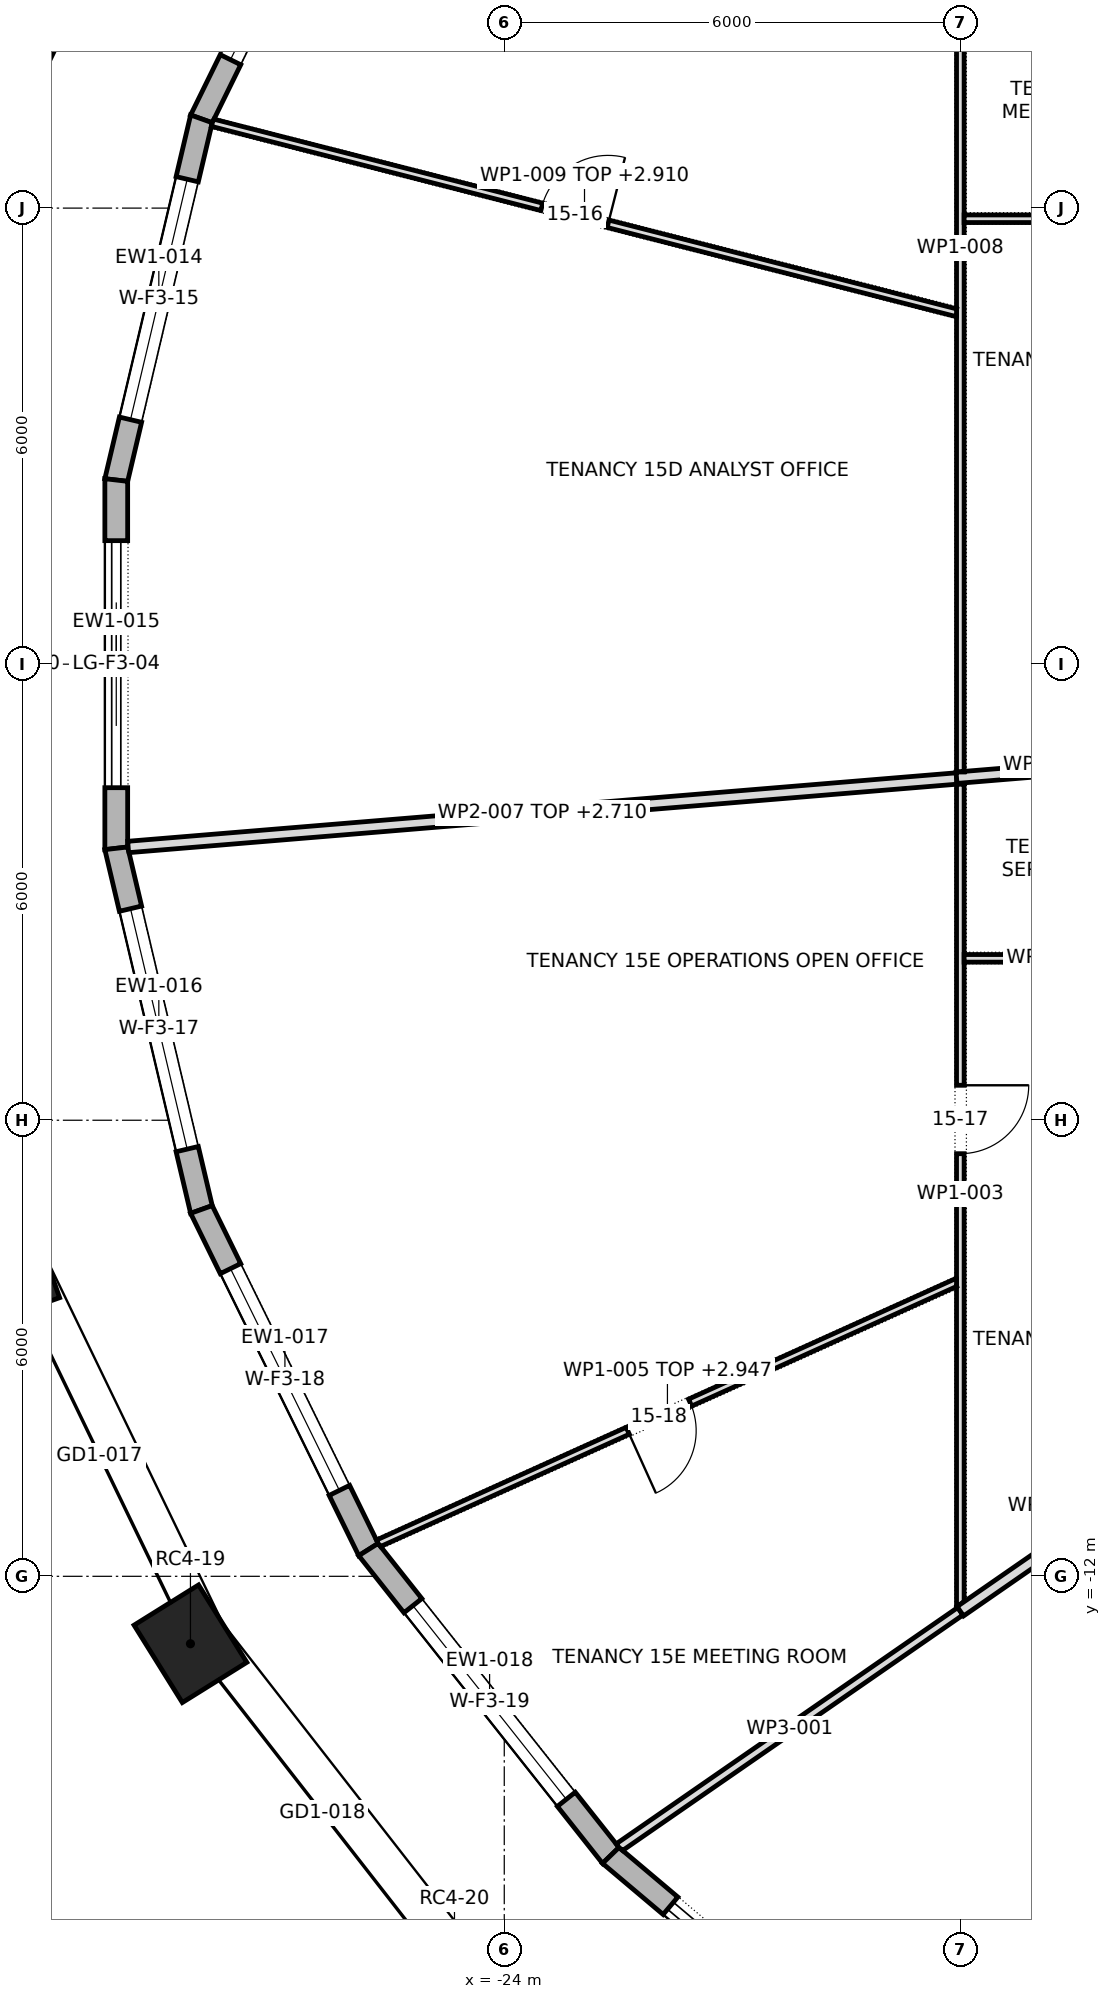
"""IFC4 building model, lengths in metres.
Left out: names, types, materials, properties, quantities, classifications, styles, units other than length and angle.
Written with IfcOpenShell. Run it as: python <this file> out.ifc"""

import sys

from ifc_helpers import new_model, si_unit, direction, frame, frame_2d, origin, origin_2d, place, context, subcontext, project, spatial, polyline, rectangle, outline, extrude, element, fill, save


model = new_model("IFC4")
c1 = context("Model", 3, precision=1e-05, world=origin(), true_north=direction((0.0, 1.0)))
c2 = subcontext(c1, "Body", "Model", "MODEL_VIEW")
j1 = project(units=[si_unit("LENGTHUNIT", "METRE"), si_unit("PLANEANGLEUNIT", "RADIAN")], contexts=[c1])
p1 = place(None, origin())
s1 = spatial("IfcSite", under=j1, at=p1, CompositionType="ELEMENT")
p2 = place(p1, origin())
s2 = spatial("IfcBuilding", under=s1, at=p2, CompositionType="ELEMENT")
p3 = place(p2, frame((0.0, 0.0, 214.9)))
s3 = spatial("IfcBuildingStorey", under=s2, at=p3, CompositionType="ELEMENT", Elevation=214.9)
for number, where, z_axis, x_axis in (
    (1, (-30.521, 7.936, 0.0), (0.0, 0.0, 1.0), (-0.334, -0.943, 0.0)),
    (2, (-30.521, -7.936, 0.0), (0.0, 0.0, 1.0), (0.334, -0.943, 0.0)),
    (3, (-28.129, -12.887, 0.0), (0.0, 0.0, 1.0), (0.529, -0.849, 0.0)),
):
    element("IfcColumn", number, at=place(p3, frame(where, z_axis=z_axis, x_axis=x_axis)), inside=s3, PredefinedType="COLUMN", context=c2, shape_type="SweptSolid", body=[
        extrude(rectangle(XDim=1.2, YDim=1.0, at=origin_2d()), origin(), (0.0, 0.0, 1.0), 4.0),
    ])
p4 = place(p3, frame((-25.787, 11.648, 0.0), z_axis=(0.0, 0.0, 1.0), x_axis=(-0.440795186599, -0.897607711348, 0.0)))
e4 = element("IfcWall", 4, at=p4, inside=s3, PredefinedType="STANDARD", context=c2, shape_type="SweptSolid", body=[
    extrude(outline(polyline([(-0.016, -0.15), (5.001, -0.15), (4.967, 0.15), (0.016, 0.15), (-0.016, -0.15)])), origin(), (0.0, 0.0, 1.0), 3.7),
])
p5 = place(p4, frame((0.867, 0.0, 0.6)))
e5 = element("IfcOpeningElement", 5, at=p5, cuts=e4, PredefinedType="OPENING", context=c2, shape_type="SweptSolid", body=[
    extrude(rectangle(XDim=3.25, YDim=2.65, at=frame_2d((1.625, 1.325))), frame((0.0, 0.162, 0.0), z_axis=(0.0, -1.0, 0.0), x_axis=(1.0, 0.0, 0.0)), (0.0, 0.0, 1.0), 0.324),
])
p6 = place(p3, frame((-27.984, 7.174, 0.0), z_axis=(0.0, 0.0, 1.0), x_axis=(-0.229546618766, -0.97329766763, 0.0)))
e6 = element("IfcWall", 6, at=p6, inside=s3, PredefinedType="STANDARD", context=c2, shape_type="SweptSolid", body=[
    extrude(outline(polyline([(-0.017, -0.15), (4.899, -0.15), (4.865, 0.15), (0.017, 0.15), (-0.017, -0.15)])), origin(), (0.0, 0.0, 1.0), 3.7),
])
p7 = place(p6, frame((0.816, 0.0, 0.6)))
e7 = element("IfcOpeningElement", 7, at=p7, cuts=e6, PredefinedType="OPENING", context=c2, shape_type="SweptSolid", body=[
    extrude(rectangle(XDim=3.25, YDim=2.65, at=frame_2d((1.625, 1.325))), frame((0.0, 0.162, 0.0), z_axis=(0.0, -1.0, 0.0), x_axis=(1.0, 0.0, 0.0)), (0.0, 0.0, 1.0), 0.324),
])
p8 = place(p3, frame((-29.104, 2.423, 0.0), z_axis=(0.0, 0.0, 1.0), x_axis=(0.0, -1.0, 0.0)))
e8 = element("IfcWall", 8, at=p8, inside=s3, PredefinedType="STANDARD", context=c2, shape_type="SweptSolid", body=[
    extrude(outline(polyline([(-0.017, -0.15), (4.863, -0.15), (4.828, 0.15), (0.017, 0.15), (-0.017, -0.15)])), origin(), (0.0, 0.0, 1.0), 3.7),
])
p9 = place(p8, frame((0.798, 0.0, 0.0)))
e9 = element("IfcOpeningElement", 9, at=p9, cuts=e8, PredefinedType="OPENING", context=c2, shape_type="SweptSolid", body=[
    extrude(rectangle(XDim=3.25, YDim=3.25, at=frame_2d((1.625, 1.625))), frame((0.0, 0.162, 0.0), z_axis=(0.0, -1.0, 0.0), x_axis=(1.0, 0.0, 0.0)), (0.0, 0.0, 1.0), 0.324),
])
p10 = place(p3, frame((-29.104, -2.423, 0.0), z_axis=(0.0, 0.0, 1.0), x_axis=(0.229546618766, -0.97329766763, 0.0)))
e10 = element("IfcWall", 10, at=p10, inside=s3, PredefinedType="STANDARD", context=c2, shape_type="SweptSolid", body=[
    extrude(outline(polyline([(-0.017, -0.15), (4.899, -0.15), (4.865, 0.15), (0.017, 0.15), (-0.017, -0.15)])), origin(), (0.0, 0.0, 1.0), 3.7),
])
p11 = place(p10, frame((0.816, 0.0, 0.6)))
e11 = element("IfcOpeningElement", 11, at=p11, cuts=e10, PredefinedType="OPENING", context=c2, shape_type="SweptSolid", body=[
    extrude(rectangle(XDim=3.25, YDim=2.65, at=frame_2d((1.625, 1.325))), frame((0.0, 0.162, 0.0), z_axis=(0.0, -1.0, 0.0), x_axis=(1.0, 0.0, 0.0)), (0.0, 0.0, 1.0), 0.324),
])
p12 = place(p3, frame((-27.984, -7.174, 0.0), z_axis=(0.0, 0.0, 1.0), x_axis=(0.440795186599, -0.897607711348, 0.0)))
e12 = element("IfcWall", 12, at=p12, inside=s3, PredefinedType="STANDARD", context=c2, shape_type="SweptSolid", body=[
    extrude(outline(polyline([(-0.017, -0.15), (5.0, -0.15), (4.968, 0.15), (0.017, 0.15), (-0.017, -0.15)])), origin(), (0.0, 0.0, 1.0), 3.7),
])
p13 = place(p12, frame((0.867, 0.0, 0.6)))
e13 = element("IfcOpeningElement", 13, at=p13, cuts=e12, PredefinedType="OPENING", context=c2, shape_type="SweptSolid", body=[
    extrude(rectangle(XDim=3.25, YDim=2.65, at=frame_2d((1.625, 1.325))), frame((0.0, 0.162, 0.0), z_axis=(0.0, -1.0, 0.0), x_axis=(1.0, 0.0, 0.0)), (0.0, 0.0, 1.0), 0.324),
])
p14 = place(p3, frame((-25.787, -11.648, 0.0), z_axis=(0.0, 0.0, 1.0), x_axis=(0.621017151557, -0.783796974651, 0.0)))
e14 = element("IfcWall", 14, at=p14, inside=s3, PredefinedType="STANDARD", context=c2, shape_type="SweptSolid", body=[
    extrude(outline(polyline([(-0.016, -0.15), (5.149, -0.15), (5.119, 0.15), (0.016, 0.15), (-0.016, -0.15)])), origin(), (0.0, 0.0, 1.0), 3.7),
])
p15 = place(p14, frame((0.942, 0.0, 0.6)))
e15 = element("IfcOpeningElement", 15, at=p15, cuts=e14, PredefinedType="OPENING", context=c2, shape_type="SweptSolid", body=[
    extrude(rectangle(XDim=3.25, YDim=2.65, at=frame_2d((1.625, 1.325))), frame((0.0, 0.162, 0.0), z_axis=(0.0, -1.0, 0.0), x_axis=(1.0, 0.0, 0.0)), (0.0, 0.0, 1.0), 0.324),
])
p16 = place(p3, frame((-22.599, -15.672, 0.0), z_axis=(0.0, 0.0, 1.0), x_axis=(0.764397795062, -0.644744919255, 0.0)))
e16 = element("IfcWall", 16, at=p16, inside=s3, PredefinedType="STANDARD", context=c2, shape_type="SweptSolid", body=[
    extrude(outline(polyline([(-0.015, -0.15), (5.319, -0.15), (5.291, 0.15), (0.015, 0.15), (-0.015, -0.15)])), origin(), (0.0, 0.0, 1.0), 3.7),
])
p17 = place(p16, frame((1.028, 0.0, 0.0)))
e17 = element("IfcOpeningElement", 17, at=p17, cuts=e16, PredefinedType="OPENING", context=c2, shape_type="SweptSolid", body=[
    extrude(rectangle(XDim=3.25, YDim=3.25, at=frame_2d((1.625, 1.625))), frame((0.0, 0.162, 0.0), z_axis=(0.0, -1.0, 0.0), x_axis=(1.0, 0.0, 0.0)), (0.0, 0.0, 1.0), 0.324),
])
p18 = place(p3, frame((-22.493, -15.569, 0.0), z_axis=(0.0, 0.0, 1.0), x_axis=(0.822322462014, 0.569021764494, 0.0)))
e18 = element("IfcWall", 18, at=p18, inside=s3, PredefinedType="PARTITIONING", context=c2, shape_type="SweptSolid", body=[
    extrude(outline(polyline([(0.02, -0.06), (1.834, -0.06), (3.649, -0.06), (5.464, -0.06), (5.464, 0.06), (3.643, 0.06), (1.821, 0.06), (0.0, 0.06), (0.0, 0.053), (0.003, 0.0), (0.02, -0.06)])), origin(), (0.0, 0.0, 1.0), 3.7),
])
p19 = place(p3, frame((-18.0, -12.421, 0.0), z_axis=(0.0, 0.0, 1.0), x_axis=(0.0, 1.0, 0.0)))
e19 = element("IfcWall", 19, at=p19, inside=s3, PredefinedType="PARTITIONING", context=c2, shape_type="SweptSolid", body=[
    extrude(outline(polyline([(0.087, -0.05), (1.77, -0.05), (3.453, -0.05), (5.136, -0.05), (6.819, -0.05), (8.501, -0.05), (8.501, -0.05), (8.601, -0.05), (8.601, -0.05), (10.842, -0.05), (10.842, 0.046), (10.842, 0.05), (9.191, 0.05), (7.541, 0.05), (5.89, 0.05), (4.24, 0.05), (4.235, 0.048), (4.234, 0.05), (2.823, 0.05), (1.411, 0.05), (0.0, 0.05), (0.0, 0.05), (0.011, 0.034), (0.023, 0.043), (0.087, -0.05)])), origin(), (0.0, 0.0, 1.0), 3.7),
])
p20 = place(p19, frame((5.981, 0.0, 0.0)))
e20 = element("IfcOpeningElement", 20, at=p20, cuts=e19, PredefinedType="OPENING", context=c2, shape_type="SweptSolid", body=[
    extrude(rectangle(XDim=0.9, YDim=2.1, at=frame_2d((0.45, 1.05))), frame((0.0, 0.062, 0.0), z_axis=(0.0, -1.0, 0.0), x_axis=(1.0, 0.0, 0.0)), (0.0, 0.0, 1.0), 0.124),
])
p21 = place(p3, frame((-18.0, -12.46, 0.0), z_axis=(0.0, 0.0, 1.0), x_axis=(0.822102584422, 0.56933938972, 0.0)))
e21 = element("IfcWall", 21, at=p21, inside=s3, PredefinedType="PARTITIONING", context=c2, shape_type="SweptSolid", body=[
    extrude(outline(polyline([(0.0, -0.075), (1.635, -0.075), (3.27, -0.075), (4.905, -0.075), (4.826, 0.075), (3.217, 0.075), (1.609, 0.075), (0.0, 0.075), (0.0, -0.075)])), origin(), (0.0, 0.0, 1.0), 2.947),
])
p22 = place(p3, frame((-18.03, -8.123, 0.0), z_axis=(0.0, 0.0, 1.0), x_axis=(-0.911431984772, -0.411450771216, 0.0)))
e22 = element("IfcWall", 22, at=p22, inside=s3, PredefinedType="PARTITIONING", context=c2, shape_type="SweptSolid", body=[
    extrude(outline(polyline([(8.372, -0.05), (8.372, -0.042), (8.371, -0.0), (8.358, 0.05), (6.696, 0.05), (5.033, 0.05), (3.37, 0.05), (1.708, 0.05), (0.045, 0.05), (0.0, -0.05), (0.0, -0.05), (1.675, -0.05), (3.349, -0.05), (5.023, -0.05), (6.698, -0.05), (8.372, -0.05)])), origin(), (0.0, 0.0, 1.0), 2.947),
])
p23 = place(p22, frame((3.868, 0.0, 0.0)))
e23 = element("IfcOpeningElement", 23, at=p23, cuts=e22, PredefinedType="OPENING", context=c2, shape_type="SweptSolid", body=[
    extrude(rectangle(XDim=0.9, YDim=2.1, at=frame_2d((0.45, 1.05))), frame((0.0, 0.062, 0.0), z_axis=(0.0, -1.0, 0.0), x_axis=(1.0, 0.0, 0.0)), (0.0, 0.0, 1.0), 0.124),
])
p24 = place(p3, frame((-17.95, -3.87, 0.0), z_axis=(0.0, 0.0, 1.0), x_axis=(1.0, 0.0, 0.0)))
e24 = element("IfcWall", 24, at=p24, inside=s3, PredefinedType="PARTITIONING", context=c2, shape_type="SweptSolid", body=[
    extrude(rectangle(XDim=2.258, YDim=0.1, at=frame_2d((1.129, 0.0))), origin(), (0.0, 0.0, 1.0), 3.7),
])
p25 = place(p3, frame((-18.049, -1.504, 0.0), z_axis=(0.0, 0.0, 1.0), x_axis=(-0.996601116086, -0.082378488796, 0.0)))
e25 = element("IfcWall", 25, at=p25, inside=s3, PredefinedType="PARTITIONING", context=c2, shape_type="SweptSolid", body=[
    extrude(outline(polyline([(10.936, -0.075), (10.936, 0.044), (10.931, 0.075), (9.11, 0.075), (7.29, 0.075), (5.469, 0.075), (3.648, 0.075), (1.828, 0.075), (0.007, 0.075), (0.007, 0.074), (0.002, 0.075), (0.0, 0.075), (0.0, -0.075), (1.823, -0.075), (3.645, -0.075), (5.468, -0.075), (7.291, -0.075), (9.113, -0.075), (10.936, -0.075)])), origin(), (0.0, 0.0, 1.0), 2.71),
])
p26 = place(p3, frame((-18.0, -1.418, 0.0), z_axis=(0.0, 0.0, 1.0), x_axis=(0.0, 1.0, 0.0)))
e26 = element("IfcWall", 26, at=p26, inside=s3, PredefinedType="PARTITIONING", context=c2, shape_type="SweptSolid", body=[
    extrude(outline(polyline([(0.008, -0.05), (1.813, -0.05), (3.618, -0.05), (5.423, -0.05), (7.229, -0.05), (7.229, -0.05), (7.328, -0.05), (7.328, -0.05), (8.934, -0.05), (10.54, -0.05), (12.146, -0.05), (13.751, -0.05), (13.821, 0.05), (13.821, 0.05), (11.889, 0.05), (9.957, 0.05), (8.025, 0.05), (6.093, 0.05), (6.092, 0.048), (6.085, 0.05), (4.564, 0.05), (3.042, 0.05), (1.521, 0.05), (0.0, 0.05), (0.0, 0.045), (0.008, -0.05)])), origin(), (0.0, 0.0, 1.0), 3.7),
])
p27 = place(p26, frame((10.128, 0.0, 0.0)))
e27 = element("IfcOpeningElement", 27, at=p27, cuts=e26, PredefinedType="OPENING", context=c2, shape_type="SweptSolid", body=[
    extrude(rectangle(XDim=0.9, YDim=2.1, at=frame_2d((0.45, 1.05))), frame((0.0, 0.062, 0.0), z_axis=(0.0, -1.0, 0.0), x_axis=(1.0, 0.0, 0.0)), (0.0, 0.0, 1.0), 0.124),
])
p28 = place(p3, frame((-18.038, 4.62, 0.0), z_axis=(0.0, 0.0, 1.0), x_axis=(-0.96889210833, 0.247483499279, 0.0)))
e28 = element("IfcWall", 28, at=p28, inside=s3, PredefinedType="PARTITIONING", context=c2, shape_type="SweptSolid", body=[
    extrude(outline(polyline([(0.025, -0.05), (1.706, -0.05), (3.386, -0.05), (5.067, -0.05), (6.747, -0.05), (8.427, -0.05), (10.108, -0.05), (10.117, -0.005), (10.117, 0.05), (8.431, 0.05), (6.745, 0.05), (5.059, 0.05), (3.373, 0.05), (1.686, 0.05), (0.0, 0.05), (0.0, 0.049), (0.025, -0.05)])), origin(), (0.0, 0.0, 1.0), 2.91),
])
p29 = place(p28, frame((4.744, 0.0, 0.0)))
e29 = element("IfcOpeningElement", 29, at=p29, cuts=e28, PredefinedType="OPENING", context=c2, shape_type="SweptSolid", body=[
    extrude(rectangle(XDim=0.9, YDim=2.1, at=frame_2d((0.45, 1.05))), frame((0.0, 0.062, 0.0), z_axis=(0.0, -1.0, 0.0), x_axis=(1.0, 0.0, 0.0)), (0.0, 0.0, 1.0), 0.124),
])
p30 = place(p3, frame((-14.069, -1.166, 0.0), z_axis=(0.0, 0.0, 1.0), x_axis=(-0.996614549641, -0.082215810186, 0.0)))
e30 = element("IfcWall", 30, at=p30, inside=s3, PredefinedType="PARTITIONING", context=c2, shape_type="SweptSolid", body=[
    extrude(outline(polyline([(0.0, -0.075), (1.944, -0.075), (3.888, -0.075), (3.888, -0.067), (3.982, -0.075), (3.994, -0.075), (3.994, 0.075), (2.003, 0.075), (0.012, 0.075), (0.0, -0.069), (0.0, -0.075)])), origin(), (0.0, 0.0, 1.0), 2.71),
])
p31 = place(p3, frame((-14.061, 5.86, 0.0), z_axis=(0.0, 0.0, 1.0), x_axis=(-1.0, 0.0, 0.0)))
e31 = element("IfcWall", 31, at=p31, inside=s3, PredefinedType="PARTITIONING", context=c2, shape_type="SweptSolid", body=[
    extrude(outline(polyline([(3.889, 0.05), (1.952, 0.05), (0.014, 0.05), (0.014, 0.0), (0.0, 0.0), (0.0, -0.05), (1.945, -0.05), (3.889, -0.05), (3.889, 0.05)])), origin(), (0.0, 0.0, 1.0), 3.7),
])
p32 = place(p3, frame((-13.598, -13.977, 0.0), z_axis=(0.0, 0.0, 1.0), x_axis=(-0.697374409368, -0.716707006494, 0.0)))
e32 = element("IfcWall", 32, at=p32, inside=s3, PredefinedType="PARTITIONING", context=c2, shape_type="SweptSolid", body=[
    extrude(outline(polyline([(6.971, -0.075), (6.971, -0.07), (6.966, -0.002), (6.946, 0.075), (5.225, 0.075), (3.505, 0.075), (1.784, 0.075), (0.063, 0.075), (0.032, 0.0), (0.0, -0.075), (1.743, -0.075), (3.486, -0.075), (5.228, -0.075), (6.971, -0.075)])), origin(), (0.0, 0.0, 1.0), 3.7),
])
p33 = place(p5, origin())
e33 = element("IfcWindow", 33, at=p33, inside=s3, PartitioningType="TRIPLE_PANEL_VERTICAL", PredefinedType="WINDOW", context=c2, shape_type="SweptSolid", body=[
    extrude(rectangle(XDim=3.25, YDim=2.65, at=frame_2d((1.625, 1.325))), frame((0.0, 0.03, 0.0), z_axis=(0.0, -1.0, 0.0), x_axis=(1.0, 0.0, 0.0)), (0.0, 0.0, 1.0), 0.06),
])
fill(e5, e33)
p34 = place(p7, origin())
e34 = element("IfcWindow", 34, at=p34, inside=s3, PartitioningType="TRIPLE_PANEL_VERTICAL", PredefinedType="WINDOW", context=c2, shape_type="SweptSolid", body=[
    extrude(rectangle(XDim=3.25, YDim=2.65, at=frame_2d((1.625, 1.325))), frame((0.0, 0.03, 0.0), z_axis=(0.0, -1.0, 0.0), x_axis=(1.0, 0.0, 0.0)), (0.0, 0.0, 1.0), 0.06),
])
fill(e7, e34)
p35 = place(p9, origin())
e35 = element("IfcDoor", 35, at=p35, inside=s3, OperationType="DOUBLE_DOOR_SLIDING", PredefinedType="DOOR", context=c2, shape_type="SweptSolid", body=[
    extrude(rectangle(XDim=3.25, YDim=3.25, at=frame_2d((1.625, 1.625))), frame((0.0, 0.025, 0.0), z_axis=(0.0, -1.0, 0.0), x_axis=(1.0, 0.0, 0.0)), (0.0, 0.0, 1.0), 0.05),
])
fill(e9, e35)
p36 = place(p11, origin())
e36 = element("IfcWindow", 36, at=p36, inside=s3, PartitioningType="TRIPLE_PANEL_VERTICAL", PredefinedType="WINDOW", context=c2, shape_type="SweptSolid", body=[
    extrude(rectangle(XDim=3.25, YDim=2.65, at=frame_2d((1.625, 1.325))), frame((0.0, 0.03, 0.0), z_axis=(0.0, -1.0, 0.0), x_axis=(1.0, 0.0, 0.0)), (0.0, 0.0, 1.0), 0.06),
])
fill(e11, e36)
p37 = place(p13, origin())
e37 = element("IfcWindow", 37, at=p37, inside=s3, PartitioningType="TRIPLE_PANEL_VERTICAL", PredefinedType="WINDOW", context=c2, shape_type="SweptSolid", body=[
    extrude(rectangle(XDim=3.25, YDim=2.65, at=frame_2d((1.625, 1.325))), frame((0.0, 0.03, 0.0), z_axis=(0.0, -1.0, 0.0), x_axis=(1.0, 0.0, 0.0)), (0.0, 0.0, 1.0), 0.06),
])
fill(e13, e37)
p38 = place(p15, origin())
e38 = element("IfcWindow", 38, at=p38, inside=s3, PartitioningType="TRIPLE_PANEL_VERTICAL", PredefinedType="WINDOW", context=c2, shape_type="SweptSolid", body=[
    extrude(rectangle(XDim=3.25, YDim=2.65, at=frame_2d((1.625, 1.325))), frame((0.0, 0.03, 0.0), z_axis=(0.0, -1.0, 0.0), x_axis=(1.0, 0.0, 0.0)), (0.0, 0.0, 1.0), 0.06),
])
fill(e15, e38)
p39 = place(p17, origin())
e39 = element("IfcDoor", 39, at=p39, inside=s3, OperationType="DOUBLE_DOOR_SLIDING", PredefinedType="DOOR", context=c2, shape_type="SweptSolid", body=[
    extrude(rectangle(XDim=3.25, YDim=3.25, at=frame_2d((1.625, 1.625))), frame((0.0, 0.025, 0.0), z_axis=(0.0, -1.0, 0.0), x_axis=(1.0, 0.0, 0.0)), (0.0, 0.0, 1.0), 0.05),
])
fill(e17, e39)
p40 = place(p29, frame((0.9, 0.0, 0.0), z_axis=(0.0, 0.0, 1.0), x_axis=(-1.0, 0.0, 0.0)))
e40 = element("IfcDoor", 40, at=p40, inside=s3, OperationType="SINGLE_SWING_LEFT", PredefinedType="DOOR", context=c2, shape_type="SweptSolid", body=[
    extrude(rectangle(XDim=0.9, YDim=2.1, at=frame_2d((0.45, 1.05))), frame((0.0, 0.025, 0.0), z_axis=(0.0, -1.0, 0.0), x_axis=(1.0, 0.0, 0.0)), (0.0, 0.0, 1.0), 0.05),
])
fill(e29, e40)
p41 = place(p20, frame((0.9, 0.0, 0.0), z_axis=(0.0, 0.0, 1.0), x_axis=(-1.0, 0.0, 0.0)))
e41 = element("IfcDoor", 41, at=p41, inside=s3, OperationType="SINGLE_SWING_RIGHT", PredefinedType="DOOR", context=c2, shape_type="SweptSolid", body=[
    extrude(rectangle(XDim=0.9, YDim=2.1, at=frame_2d((0.45, 1.05))), frame((0.0, 0.025, 0.0), z_axis=(0.0, -1.0, 0.0), x_axis=(1.0, 0.0, 0.0)), (0.0, 0.0, 1.0), 0.05),
])
fill(e20, e41)
p42 = place(p23, origin())
e42 = element("IfcDoor", 42, at=p42, inside=s3, OperationType="SINGLE_SWING_LEFT", PredefinedType="DOOR", context=c2, shape_type="SweptSolid", body=[
    extrude(rectangle(XDim=0.9, YDim=2.1, at=frame_2d((0.45, 1.05))), frame((0.0, 0.025, 0.0), z_axis=(0.0, -1.0, 0.0), x_axis=(1.0, 0.0, 0.0)), (0.0, 0.0, 1.0), 0.05),
])
fill(e23, e42)
save(model, sys.argv[1])
